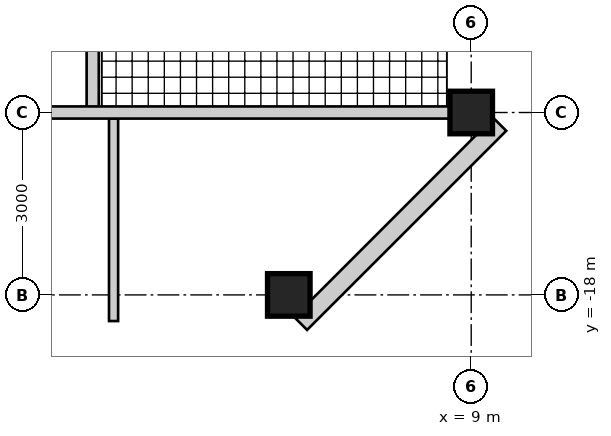
"""IFC4 building model, lengths in metres.
Left out: names, types, materials, properties, quantities, classifications, styles, units other than length and angle.
Written with IfcOpenShell. Run it as: python <this file> out.ifc"""

import sys

from ifc_helpers import new_model, si_unit, direction, frame, frame_2d, origin, origin_2d, place, context, subcontext, project, spatial, rectangle, hollow_rectangle, extrude, element, fill, save


model = new_model("IFC4")
c1 = context("Model", 3, precision=1e-05, world=origin(), true_north=direction((0.0, 1.0)))
c2 = subcontext(c1, "Body", "Model", "MODEL_VIEW")
j1 = project(units=[si_unit("LENGTHUNIT", "METRE"), si_unit("PLANEANGLEUNIT", "RADIAN")], contexts=[c1])
p1 = place(None, origin())
s1 = spatial("IfcSite", under=j1, at=p1, CompositionType="ELEMENT")
p2 = place(p1, origin())
s2 = spatial("IfcBuilding", under=s1, at=p2, CompositionType="ELEMENT")
p3 = place(p2, frame((0.0, 0.0, 278.1)))
s3 = spatial("IfcBuildingStorey", under=s2, at=p3, CompositionType="ELEMENT", Elevation=278.1)
for number, where, z_axis, x_axis in (
    (1, (9.0, -15.0, 0.0), (0.0, 0.0, 1.0), (1.0, 0.0, 0.0)),
    (2, (6.0, -18.0, 0.0), (0.0, 0.0, 1.0), (1.0, 0.0, 0.0)),
):
    element("IfcColumn", number, at=place(p3, frame(where, z_axis=z_axis, x_axis=x_axis)), inside=s3, PredefinedType="COLUMN", context=c2, shape_type="SweptSolid", body=[
        extrude(rectangle(XDim=0.7, YDim=0.7, at=origin_2d()), origin(), (0.0, 0.0, 1.0), 3.4),
    ])
p4 = place(p3, frame((6.195, -18.47, 0.0), z_axis=(0.0, 0.0, 1.0), x_axis=(0.707106781187, 0.707106781187, 0.0)))
e3 = element("IfcWall", 3, at=p4, inside=s3, PredefinedType="SOLIDWALL", context=c2, shape_type="SweptSolid", body=[
    extrude(rectangle(XDim=4.632, YDim=0.3, at=frame_2d((2.316, 0.0))), origin(), (0.0, 0.0, 1.0), 3.22),
])
p5 = place(p4, frame((1.866, 0.0, 0.3)))
e4 = element("IfcOpeningElement", 4, at=p5, cuts=e3, PredefinedType="OPENING", context=c2, shape_type="SweptSolid", body=[
    extrude(rectangle(XDim=0.9, YDim=2.4, at=frame_2d((0.45, 1.2))), frame((0.0, 0.16, 0.0), z_axis=(0.0, -1.0, 0.0), x_axis=(1.0, 0.0, 0.0)), (0.0, 0.0, 1.0), 0.32),
])
p6 = place(p3, frame((2.775, -9.4, 0.0), z_axis=(0.0, 0.0, 1.0), x_axis=(0.0, -1.0, 0.0)))
e5 = element("IfcWall", 5, at=p6, inside=s3, PredefinedType="SOLIDWALL", context=c2, shape_type="SweptSolid", body=[
    extrude(rectangle(XDim=5.6, YDim=0.2, at=frame_2d((2.8, 0.0))), origin(), (0.0, 0.0, 1.0), 3.22),
])
p7 = place(p6, frame((3.4, 0.0, 0.0)))
e6 = element("IfcOpeningElement", 6, at=p7, cuts=e5, PredefinedType="OPENING", context=c2, shape_type="SweptSolid", body=[
    extrude(rectangle(XDim=1.0, YDim=2.15, at=frame_2d((0.5, 1.075))), frame((0.0, 0.11, 0.0), z_axis=(0.0, -1.0, 0.0), x_axis=(1.0, 0.0, 0.0)), (0.0, 0.0, 1.0), 0.22),
])
p8 = place(p3, frame((3.118, -15.1, 0.0), z_axis=(0.0, 0.0, 1.0), x_axis=(0.0, -1.0, 0.0)))
e7 = element("IfcWall", 7, at=p8, inside=s3, PredefinedType="PARTITIONING", context=c2, shape_type="SweptSolid", body=[
    extrude(rectangle(XDim=3.33, YDim=0.15, at=frame_2d((1.665, 0.0))), origin(), (0.0, 0.0, 1.0), 3.22),
])
p9 = place(p8, frame((0.6, 0.0, 0.0)))
e8 = element("IfcOpeningElement", 8, at=p9, cuts=e7, PredefinedType="OPENING", context=c2, shape_type="SweptSolid", body=[
    extrude(rectangle(XDim=1.0, YDim=2.1, at=frame_2d((0.5, 1.05))), frame((0.0, 0.085, 0.0), z_axis=(0.0, -1.0, 0.0), x_axis=(1.0, 0.0, 0.0)), (0.0, 0.0, 1.0), 0.17),
])
p10 = place(p3, frame((0.3, -15.0, 0.0), z_axis=(0.0, 0.0, 1.0), x_axis=(1.0, 0.0, 0.0)))
e9 = element("IfcWall", 9, at=p10, inside=s3, PredefinedType="SOLIDWALL", context=c2, shape_type="SweptSolid", body=[
    extrude(rectangle(XDim=8.35, YDim=0.2, at=frame_2d((4.175, 0.0))), origin(), (0.0, 0.0, 1.0), 2.52),
])
p11 = place(p10, frame((0.4, 0.0, 0.0)))
e10 = element("IfcOpeningElement", 10, at=p11, cuts=e9, PredefinedType="OPENING", context=c2, shape_type="SweptSolid", body=[
    extrude(rectangle(XDim=1.0, YDim=2.2, at=frame_2d((0.5, 1.1))), frame((0.0, 0.11, 0.0), z_axis=(0.0, -1.0, 0.0), x_axis=(1.0, 0.0, 0.0)), (0.0, 0.0, 1.0), 0.22),
])
p12 = place(p5, origin())
e11 = element("IfcWindow", 11, at=p12, inside=s3, PartitioningType="SINGLE_PANEL", PredefinedType="WINDOW", context=c2, shape_type="SweptSolid", body=[
    extrude(hollow_rectangle(XDim=0.9, YDim=2.4, WallThickness=0.06, at=frame_2d((0.45, 1.2))), frame((0.0, 0.03, 0.0), z_axis=(0.0, -1.0, 0.0), x_axis=(1.0, 0.0, 0.0)), (0.0, 0.0, 1.0), 0.06),
    extrude(rectangle(XDim=0.779, YDim=2.279, at=frame_2d((0.45, 1.2))), frame((0.0, 0.03, 0.0), z_axis=(0.0, -1.0, 0.0), x_axis=(1.0, 0.0, 0.0)), (0.0, 0.0, 1.0), 0.06),
])
fill(e4, e11)
p13 = place(p9, frame((1.0, 0.0, 0.0), z_axis=(0.0, 0.0, 1.0), x_axis=(-1.0, 0.0, 0.0)))
e12 = element("IfcDoor", 12, at=p13, inside=s3, OperationType="SINGLE_SWING_RIGHT", PredefinedType="DOOR", context=c2, shape_type="SweptSolid", body=[
    extrude(rectangle(XDim=1.0, YDim=2.1, at=frame_2d((0.5, 1.05))), frame((0.0, 0.025, 0.0), z_axis=(0.0, -1.0, 0.0), x_axis=(1.0, 0.0, 0.0)), (0.0, 0.0, 1.0), 0.05),
])
fill(e8, e12)
save(model, sys.argv[1])
